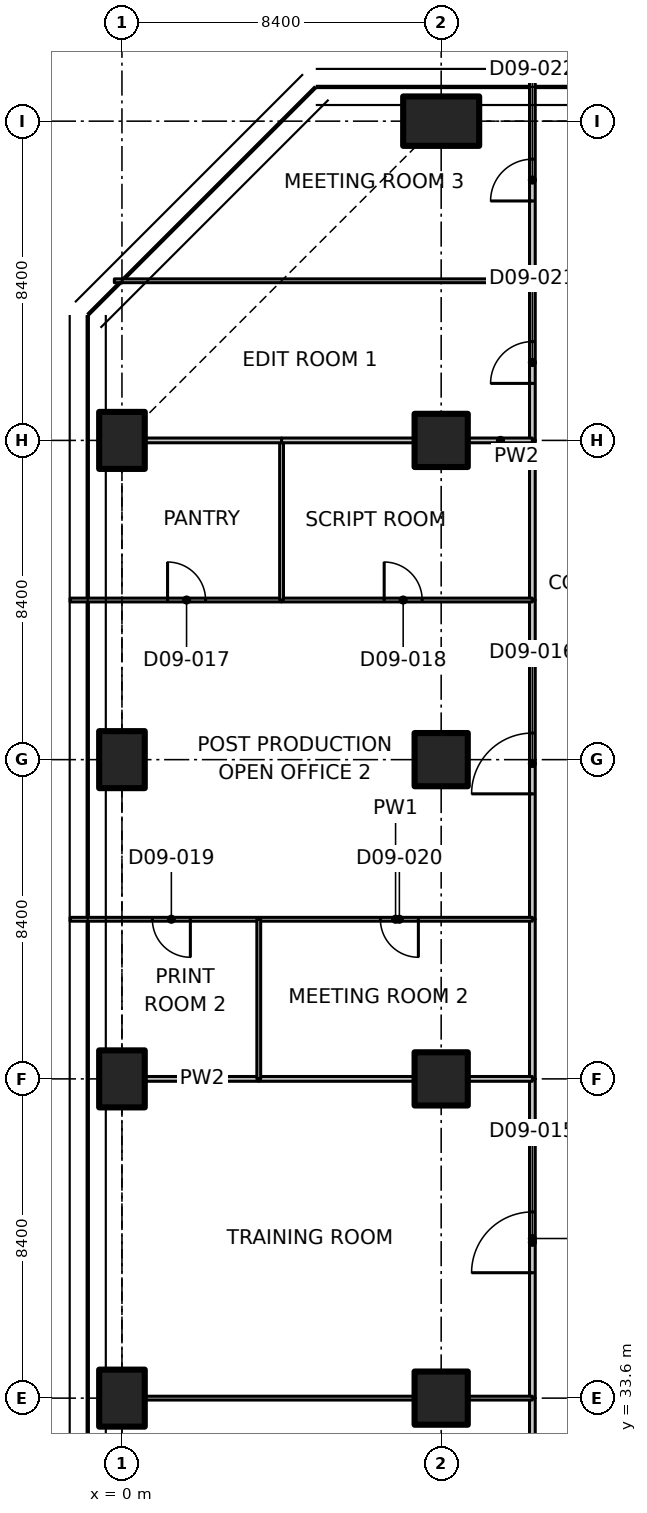
"""IFC4 building model, lengths in metres.
Left out: names, types, materials, properties, quantities, classifications, styles, units other than length and angle.
Written with IfcOpenShell. Run it as: python <this file> out.ifc"""

import sys

from ifc_helpers import new_model, si_unit, direction, frame, frame_2d, origin, origin_2d, place, context, subcontext, project, spatial, polyline, rectangle, outline, extrude, element, fill, save


model = new_model("IFC4")
c1 = context("Model", 3, precision=1e-05, world=origin(), true_north=direction((0.0, 1.0)))
c2 = subcontext(c1, "Body", "Model", "MODEL_VIEW")
j1 = project(units=[si_unit("LENGTHUNIT", "METRE"), si_unit("PLANEANGLEUNIT", "RADIAN")], contexts=[c1])
p1 = place(None, origin())
s1 = spatial("IfcSite", under=j1, at=p1, CompositionType="ELEMENT")
p2 = place(p1, origin())
s2 = spatial("IfcBuilding", under=s1, at=p2, CompositionType="ELEMENT")
p3 = place(p2, frame((0.0, 0.0, 61.7)))
s3 = spatial("IfcBuildingStorey", under=s2, at=p3, CompositionType="ELEMENT", Elevation=61.7)
for number, where, z_axis, x_axis in (
    (1, (0.0, 33.6, 0.0), (0.0, 0.0, 1.0), (1.0, 0.0, 0.0)),
    (2, (0.0, 42.0, 0.0), (0.0, 0.0, 1.0), (1.0, 0.0, 0.0)),
    (3, (0.0, 50.4, 0.0), (0.0, 0.0, 1.0), (1.0, 0.0, 0.0)),
    (4, (0.0, 58.8, 0.0), (0.0, 0.0, 1.0), (1.0, 0.0, 0.0)),
):
    element("IfcColumn", number, at=place(p3, frame(where, z_axis=z_axis, x_axis=x_axis)), inside=s3, PredefinedType="COLUMN", context=c2, shape_type="SweptSolid", body=[
        extrude(rectangle(XDim=1.2, YDim=1.5, at=origin_2d()), origin(), (0.0, 0.0, 1.0), 3.35),
    ])
for number, where, z_axis, x_axis in (
    (5, (8.4, 33.6, 0.0), (0.0, 0.0, 1.0), (1.0, 0.0, 0.0)),
    (6, (8.4, 42.0, 0.0), (0.0, 0.0, 1.0), (1.0, 0.0, 0.0)),
    (7, (8.4, 50.4, 0.0), (0.0, 0.0, 1.0), (1.0, 0.0, 0.0)),
    (8, (8.4, 58.8, 0.0), (0.0, 0.0, 1.0), (1.0, 0.0, 0.0)),
):
    element("IfcColumn", number, at=place(p3, frame(where, z_axis=z_axis, x_axis=x_axis)), inside=s3, PredefinedType="COLUMN", context=c2, shape_type="SweptSolid", body=[
        extrude(rectangle(XDim=1.4, YDim=1.4, at=origin_2d()), origin(), (0.0, 0.0, 1.0), 3.35),
    ])
p4 = place(p3, frame((8.4, 67.2, 0.0), z_axis=(0.0, 0.0, 1.0), x_axis=(0.0, 1.0, 0.0)))
e9 = element("IfcColumn", 9, at=p4, inside=s3, PredefinedType="COLUMN", context=c2, shape_type="SweptSolid", body=[
    extrude(rectangle(XDim=1.3, YDim=2.0, at=origin_2d()), origin(), (0.0, 0.0, 1.0), 3.35),
])
p5 = place(p3, frame((10.8, 25.2, 0.0), z_axis=(0.0, 0.0, 1.0), x_axis=(0.0, 1.0, 0.0)))
e10 = element("IfcWall", 10, at=p5, inside=s3, PredefinedType="PARTITIONING", context=c2, shape_type="SweptSolid", body=[
    extrude(rectangle(XDim=8.4, YDim=0.15, at=frame_2d((4.2, 0.0))), origin(), (0.0, 0.0, 1.0), 3.33),
])
p6 = place(p5, frame((3.3, 0.0, 0.0)))
e11 = element("IfcOpeningElement", 11, at=p6, cuts=e10, PredefinedType="OPENING", context=c2, shape_type="SweptSolid", body=[
    extrude(rectangle(XDim=1.6, YDim=2.1, at=frame_2d((0.8, 1.05))), frame((0.0, 0.085, 0.0), z_axis=(0.0, -1.0, 0.0), x_axis=(1.0, 0.0, 0.0)), (0.0, 0.0, 1.0), 0.17),
])
p7 = place(p3, frame((10.8, 33.6, 0.0), z_axis=(0.0, 0.0, 1.0), x_axis=(0.0, 1.0, 0.0)))
e12 = element("IfcWall", 12, at=p7, inside=s3, PredefinedType="PARTITIONING", context=c2, shape_type="SweptSolid", body=[
    extrude(rectangle(XDim=8.4, YDim=0.15, at=frame_2d((4.2, 0.0))), origin(), (0.0, 0.0, 1.0), 3.33),
])
p8 = place(p7, frame((3.3, 0.0, 0.0)))
e13 = element("IfcOpeningElement", 13, at=p8, cuts=e12, PredefinedType="OPENING", context=c2, shape_type="SweptSolid", body=[
    extrude(rectangle(XDim=1.6, YDim=2.1, at=frame_2d((0.8, 1.05))), frame((0.0, 0.085, 0.0), z_axis=(0.0, -1.0, 0.0), x_axis=(1.0, 0.0, 0.0)), (0.0, 0.0, 1.0), 0.17),
])
p9 = place(p3, frame((10.8, 46.2, 0.0), z_axis=(0.0, 0.0, 1.0), x_axis=(0.0, 1.0, 0.0)))
e14 = element("IfcWall", 14, at=p9, inside=s3, PredefinedType="PARTITIONING", context=c2, shape_type="SweptSolid", body=[
    extrude(rectangle(XDim=8.4, YDim=0.15, at=frame_2d((4.2, 0.0))), origin(), (0.0, 0.0, 1.0), 3.33),
])
p10 = place(p9, frame((3.3, 0.0, 0.0)))
e15 = element("IfcOpeningElement", 15, at=p10, cuts=e14, PredefinedType="OPENING", context=c2, shape_type="SweptSolid", body=[
    extrude(rectangle(XDim=1.6, YDim=2.1, at=frame_2d((0.8, 1.05))), frame((0.0, 0.085, 0.0), z_axis=(0.0, -1.0, 0.0), x_axis=(1.0, 0.0, 0.0)), (0.0, 0.0, 1.0), 0.17),
])
for number, where, z_axis, x_axis in (
    (16, (10.8, 54.6, 0.0), (0.0, 0.0, 1.0), (0.0, 1.0, 0.0)),
    (17, (10.8, 42.0, 0.0), (0.0, 0.0, 1.0), (0.0, 1.0, 0.0)),
):
    element("IfcWall", number, at=place(p3, frame(where, z_axis=z_axis, x_axis=x_axis)), inside=s3, PredefinedType="PARTITIONING", context=c2, shape_type="SweptSolid", body=[
        extrude(rectangle(XDim=4.2, YDim=0.15, at=frame_2d((2.1, 0.0))), origin(), (0.0, 0.0, 1.0), 3.33),
    ])
p11 = place(p3, frame((10.8, 58.8, 0.0), z_axis=(0.0, 0.0, 1.0), x_axis=(0.0, 1.0, 0.0)))
e18 = element("IfcWall", 18, at=p11, inside=s3, PredefinedType="PARTITIONING", context=c2, shape_type="SweptSolid", body=[
    extrude(rectangle(XDim=4.2, YDim=0.15, at=frame_2d((2.1, 0.0))), origin(), (0.0, 0.0, 1.0), 3.33),
])
p12 = place(p11, frame((1.5, 0.0, 0.0)))
e19 = element("IfcOpeningElement", 19, at=p12, cuts=e18, PredefinedType="OPENING", context=c2, shape_type="SweptSolid", body=[
    extrude(rectangle(XDim=1.1, YDim=2.1, at=frame_2d((0.55, 1.05))), frame((0.0, 0.085, 0.0), z_axis=(0.0, -1.0, 0.0), x_axis=(1.0, 0.0, 0.0)), (0.0, 0.0, 1.0), 0.17),
])
p13 = place(p3, frame((10.8, 63.0, 0.0), z_axis=(0.0, 0.0, 1.0), x_axis=(0.0, 1.0, 0.0)))
e20 = element("IfcWall", 20, at=p13, inside=s3, PredefinedType="PARTITIONING", context=c2, shape_type="SweptSolid", body=[
    extrude(outline(polyline([(0.0, 0.0), (5.514, 0.0), (5.514, 3.33), (5.28, 3.33), (4.65, 3.33), (4.648, 2.98), (3.752, 2.98), (3.75, 3.33), (0.0, 3.33), (0.0, 0.0)])), frame((0.0, 0.075, 0.0), z_axis=(0.0, -1.0, 0.0), x_axis=(1.0, 0.0, 0.0)), (0.0, 0.0, 1.0), 0.15),
])
p14 = place(p13, frame((2.1, 0.0, 0.0)))
e21 = element("IfcOpeningElement", 21, at=p14, cuts=e20, PredefinedType="OPENING", context=c2, shape_type="SweptSolid", body=[
    extrude(rectangle(XDim=1.1, YDim=2.1, at=frame_2d((0.55, 1.05))), frame((0.0, 0.085, 0.0), z_axis=(0.0, -1.0, 0.0), x_axis=(1.0, 0.0, 0.0)), (0.0, 0.0, 1.0), 0.17),
])
p15 = place(p3, frame((0.62, 33.6, 0.0), z_axis=(0.0, 0.0, 1.0), x_axis=(1.0, 0.0, 0.0)))
e22 = element("IfcWall", 22, at=p15, inside=s3, PredefinedType="PARTITIONING", context=c2, shape_type="SweptSolid", body=[
    extrude(rectangle(XDim=7.06, YDim=0.1, at=frame_2d((3.53, 0.0))), origin(), (0.0, 0.0, 1.0), 3.33),
])
p16 = place(p3, frame((9.12, 33.6, 0.0), z_axis=(0.0, 0.0, 1.0), x_axis=(1.0, 0.0, 0.0)))
e23 = element("IfcWall", 23, at=p16, inside=s3, PredefinedType="PARTITIONING", context=c2, shape_type="SweptSolid", body=[
    extrude(rectangle(XDim=1.68, YDim=0.1, at=frame_2d((0.84, 0.0))), origin(), (0.0, 0.0, 1.0), 3.33),
])
p17 = place(p3, frame((0.62, 42.0, 0.0), z_axis=(0.0, 0.0, 1.0), x_axis=(1.0, 0.0, 0.0)))
e24 = element("IfcWall", 24, at=p17, inside=s3, PredefinedType="PARTITIONING", context=c2, shape_type="SweptSolid", body=[
    extrude(rectangle(XDim=2.98, YDim=0.125, at=frame_2d((1.49, 0.0))), origin(), (0.0, 0.0, 1.0), 3.33),
])
p18 = place(p3, frame((3.6, 42.0, 0.0), z_axis=(0.0, 0.0, 1.0), x_axis=(1.0, 0.0, 0.0)))
e25 = element("IfcWall", 25, at=p18, inside=s3, PredefinedType="PARTITIONING", context=c2, shape_type="SweptSolid", body=[
    extrude(rectangle(XDim=4.08, YDim=0.125, at=frame_2d((2.04, 0.0))), origin(), (0.0, 0.0, 1.0), 3.33),
])
p19 = place(p3, frame((9.12, 42.0, 0.0), z_axis=(0.0, 0.0, 1.0), x_axis=(1.0, 0.0, 0.0)))
e26 = element("IfcWall", 26, at=p19, inside=s3, PredefinedType="PARTITIONING", context=c2, shape_type="SweptSolid", body=[
    extrude(rectangle(XDim=1.68, YDim=0.125, at=frame_2d((0.84, 0.0))), origin(), (0.0, 0.0, 1.0), 3.33),
])
p20 = place(p3, frame((-1.365, 54.6, 0.0), z_axis=(0.0, 0.0, 1.0), x_axis=(1.0, 0.0, 0.0)))
e27 = element("IfcWall", 27, at=p20, inside=s3, PredefinedType="PARTITIONING", context=c2, shape_type="SweptSolid", body=[
    extrude(outline(polyline([(0.0, 0.0), (5.565, 0.0), (5.565, 3.33), (1.815, 3.33), (1.813, 2.98), (0.917, 2.98), (0.915, 3.33), (0.265, 3.33), (0.0, 3.33), (0.0, 0.0)])), frame((0.0, 0.05, 0.0), z_axis=(0.0, -1.0, 0.0), x_axis=(1.0, 0.0, 0.0)), (0.0, 0.0, 1.0), 0.1),
])
p21 = place(p20, frame((2.565, 0.0, 0.0)))
e28 = element("IfcOpeningElement", 28, at=p21, cuts=e27, PredefinedType="OPENING", context=c2, shape_type="SweptSolid", body=[
    extrude(rectangle(XDim=1.0, YDim=2.1, at=frame_2d((0.5, 1.05))), frame((0.0, 0.06, 0.0), z_axis=(0.0, -1.0, 0.0), x_axis=(1.0, 0.0, 0.0)), (0.0, 0.0, 1.0), 0.12),
])
p22 = place(p3, frame((4.2, 54.6, 0.0), z_axis=(0.0, 0.0, 1.0), x_axis=(1.0, 0.0, 0.0)))
e29 = element("IfcWall", 29, at=p22, inside=s3, PredefinedType="PARTITIONING", context=c2, shape_type="SweptSolid", body=[
    extrude(rectangle(XDim=6.6, YDim=0.1, at=frame_2d((3.3, 0.0))), origin(), (0.0, 0.0, 1.0), 3.33),
])
p23 = place(p22, frame((2.7, 0.0, 0.0)))
e30 = element("IfcOpeningElement", 30, at=p23, cuts=e29, PredefinedType="OPENING", context=c2, shape_type="SweptSolid", body=[
    extrude(rectangle(XDim=1.0, YDim=2.1, at=frame_2d((0.5, 1.05))), frame((0.0, 0.06, 0.0), z_axis=(0.0, -1.0, 0.0), x_axis=(1.0, 0.0, 0.0)), (0.0, 0.0, 1.0), 0.12),
])
p24 = place(p3, frame((3.6, 46.2, 0.0), z_axis=(0.0, 0.0, 1.0), x_axis=(-1.0, 0.0, 0.0)))
e31 = element("IfcWall", 31, at=p24, inside=s3, PredefinedType="PARTITIONING", context=c2, shape_type="SweptSolid", body=[
    extrude(outline(polyline([(0.0, 0.0), (4.965, 0.0), (4.965, 3.33), (4.7, 3.33), (4.05, 3.33), (4.048, 2.98), (3.152, 2.98), (3.15, 3.33), (0.0, 3.33), (0.0, 0.0)])), frame((0.0, 0.05, 0.0), z_axis=(0.0, -1.0, 0.0), x_axis=(1.0, 0.0, 0.0)), (0.0, 0.0, 1.0), 0.1),
])
p25 = place(p24, frame((1.8, 0.0, 0.0)))
e32 = element("IfcOpeningElement", 32, at=p25, cuts=e31, PredefinedType="OPENING", context=c2, shape_type="SweptSolid", body=[
    extrude(rectangle(XDim=1.0, YDim=2.1, at=frame_2d((0.5, 1.05))), frame((0.0, 0.06, 0.0), z_axis=(0.0, -1.0, 0.0), x_axis=(1.0, 0.0, 0.0)), (0.0, 0.0, 1.0), 0.12),
])
p26 = place(p3, frame((10.8, 46.2, 0.0), z_axis=(0.0, 0.0, 1.0), x_axis=(-1.0, 0.0, 0.0)))
e33 = element("IfcWall", 33, at=p26, inside=s3, PredefinedType="PARTITIONING", context=c2, shape_type="SweptSolid", body=[
    extrude(rectangle(XDim=7.2, YDim=0.1, at=frame_2d((3.6, 0.0))), origin(), (0.0, 0.0, 1.0), 3.33),
])
p27 = place(p26, frame((3.0, 0.0, 0.0)))
e34 = element("IfcOpeningElement", 34, at=p27, cuts=e33, PredefinedType="OPENING", context=c2, shape_type="SweptSolid", body=[
    extrude(rectangle(XDim=1.0, YDim=2.1, at=frame_2d((0.5, 1.05))), frame((0.0, 0.06, 0.0), z_axis=(0.0, -1.0, 0.0), x_axis=(1.0, 0.0, 0.0)), (0.0, 0.0, 1.0), 0.12),
])
p28 = place(p3, frame((4.2, 58.8, 0.0), z_axis=(0.0, 0.0, 1.0), x_axis=(0.0, -1.0, 0.0)))
e35 = element("IfcWall", 35, at=p28, inside=s3, PredefinedType="PARTITIONING", context=c2, shape_type="SweptSolid", body=[
    extrude(rectangle(XDim=4.2, YDim=0.1, at=frame_2d((2.1, 0.0))), origin(), (0.0, 0.0, 1.0), 3.33),
])
p29 = place(p3, frame((0.62, 58.8, 0.0), z_axis=(0.0, 0.0, 1.0), x_axis=(1.0, 0.0, 0.0)))
e36 = element("IfcWall", 36, at=p29, inside=s3, PredefinedType="PARTITIONING", context=c2, shape_type="SweptSolid", body=[
    extrude(rectangle(XDim=3.58, YDim=0.125, at=frame_2d((1.79, 0.0))), origin(), (0.0, 0.0, 1.0), 3.33),
])
p30 = place(p3, frame((4.2, 58.8, 0.0), z_axis=(0.0, 0.0, 1.0), x_axis=(1.0, 0.0, 0.0)))
e37 = element("IfcWall", 37, at=p30, inside=s3, PredefinedType="PARTITIONING", context=c2, shape_type="SweptSolid", body=[
    extrude(rectangle(XDim=3.48, YDim=0.125, at=frame_2d((1.74, 0.0))), origin(), (0.0, 0.0, 1.0), 3.33),
])
p31 = place(p3, frame((9.12, 58.8, 0.0), z_axis=(0.0, 0.0, 1.0), x_axis=(1.0, 0.0, 0.0)))
e38 = element("IfcWall", 38, at=p31, inside=s3, PredefinedType="PARTITIONING", context=c2, shape_type="SweptSolid", body=[
    extrude(rectangle(XDim=1.68, YDim=0.125, at=frame_2d((0.84, 0.0))), origin(), (0.0, 0.0, 1.0), 3.33),
])
p32 = place(p3, frame((3.6, 46.2, 0.0), z_axis=(0.0, 0.0, 1.0), x_axis=(0.0, -1.0, 0.0)))
e39 = element("IfcWall", 39, at=p32, inside=s3, PredefinedType="PARTITIONING", context=c2, shape_type="SweptSolid", body=[
    extrude(rectangle(XDim=4.2, YDim=0.1, at=frame_2d((2.1, 0.0))), origin(), (0.0, 0.0, 1.0), 3.33),
])
p33 = place(p3, frame((-0.2, 63.0, 0.0), z_axis=(0.0, 0.0, 1.0), x_axis=(1.0, 0.0, 0.0)))
e40 = element("IfcWall", 40, at=p33, inside=s3, PredefinedType="PARTITIONING", context=c2, shape_type="SweptSolid", body=[
    extrude(outline(polyline([(0.0, 0.0), (11.0, 0.0), (11.0, 3.33), (5.066, 3.33), (5.064, 2.98), (3.736, 2.98), (3.734, 3.33), (0.0, 3.33), (0.0, 0.0)])), frame((0.0, 0.05, 0.0), z_axis=(0.0, -1.0, 0.0), x_axis=(1.0, 0.0, 0.0)), (0.0, 0.0, 1.0), 0.1),
])
p34 = place(p8, origin())
e41 = element("IfcDoor", 41, at=p34, inside=s3, OperationType="DOUBLE_DOOR_SINGLE_SWING", PredefinedType="DOOR", context=c2, shape_type="SweptSolid", body=[
    extrude(rectangle(XDim=1.6, YDim=2.1, at=frame_2d((0.8, 1.05))), frame((0.0, 0.025, 0.0), z_axis=(0.0, -1.0, 0.0), x_axis=(1.0, 0.0, 0.0)), (0.0, 0.0, 1.0), 0.05),
])
fill(e13, e41)
p35 = place(p10, origin())
e42 = element("IfcDoor", 42, at=p35, inside=s3, OperationType="DOUBLE_DOOR_SINGLE_SWING", PredefinedType="DOOR", context=c2, shape_type="SweptSolid", body=[
    extrude(rectangle(XDim=1.6, YDim=2.1, at=frame_2d((0.8, 1.05))), frame((0.0, 0.025, 0.0), z_axis=(0.0, -1.0, 0.0), x_axis=(1.0, 0.0, 0.0)), (0.0, 0.0, 1.0), 0.05),
])
fill(e15, e42)
p36 = place(p21, origin())
e43 = element("IfcDoor", 43, at=p36, inside=s3, OperationType="SINGLE_SWING_LEFT", PredefinedType="DOOR", context=c2, shape_type="SweptSolid", body=[
    extrude(rectangle(XDim=1.0, YDim=2.1, at=frame_2d((0.5, 1.05))), frame((0.0, 0.025, 0.0), z_axis=(0.0, -1.0, 0.0), x_axis=(1.0, 0.0, 0.0)), (0.0, 0.0, 1.0), 0.05),
])
fill(e28, e43)
p37 = place(p23, origin())
e44 = element("IfcDoor", 44, at=p37, inside=s3, OperationType="SINGLE_SWING_LEFT", PredefinedType="DOOR", context=c2, shape_type="SweptSolid", body=[
    extrude(rectangle(XDim=1.0, YDim=2.1, at=frame_2d((0.5, 1.05))), frame((0.0, 0.025, 0.0), z_axis=(0.0, -1.0, 0.0), x_axis=(1.0, 0.0, 0.0)), (0.0, 0.0, 1.0), 0.05),
])
fill(e30, e44)
p38 = place(p25, origin())
e45 = element("IfcDoor", 45, at=p38, inside=s3, OperationType="SINGLE_SWING_LEFT", PredefinedType="DOOR", context=c2, shape_type="SweptSolid", body=[
    extrude(rectangle(XDim=1.0, YDim=2.1, at=frame_2d((0.5, 1.05))), frame((0.0, 0.025, 0.0), z_axis=(0.0, -1.0, 0.0), x_axis=(1.0, 0.0, 0.0)), (0.0, 0.0, 1.0), 0.05),
])
fill(e32, e45)
p39 = place(p27, origin())
e46 = element("IfcDoor", 46, at=p39, inside=s3, OperationType="SINGLE_SWING_LEFT", PredefinedType="DOOR", context=c2, shape_type="SweptSolid", body=[
    extrude(rectangle(XDim=1.0, YDim=2.1, at=frame_2d((0.5, 1.05))), frame((0.0, 0.025, 0.0), z_axis=(0.0, -1.0, 0.0), x_axis=(1.0, 0.0, 0.0)), (0.0, 0.0, 1.0), 0.05),
])
fill(e34, e46)
p40 = place(p12, origin())
e47 = element("IfcDoor", 47, at=p40, inside=s3, OperationType="SINGLE_SWING_LEFT", PredefinedType="DOOR", context=c2, shape_type="SweptSolid", body=[
    extrude(rectangle(XDim=1.1, YDim=2.1, at=frame_2d((0.55, 1.05))), frame((0.0, 0.025, 0.0), z_axis=(0.0, -1.0, 0.0), x_axis=(1.0, 0.0, 0.0)), (0.0, 0.0, 1.0), 0.05),
])
fill(e19, e47)
p41 = place(p14, origin())
e48 = element("IfcDoor", 48, at=p41, inside=s3, OperationType="SINGLE_SWING_LEFT", PredefinedType="DOOR", context=c2, shape_type="SweptSolid", body=[
    extrude(rectangle(XDim=1.1, YDim=2.1, at=frame_2d((0.55, 1.05))), frame((0.0, 0.025, 0.0), z_axis=(0.0, -1.0, 0.0), x_axis=(1.0, 0.0, 0.0)), (0.0, 0.0, 1.0), 0.05),
])
fill(e21, e48)
save(model, sys.argv[1])
